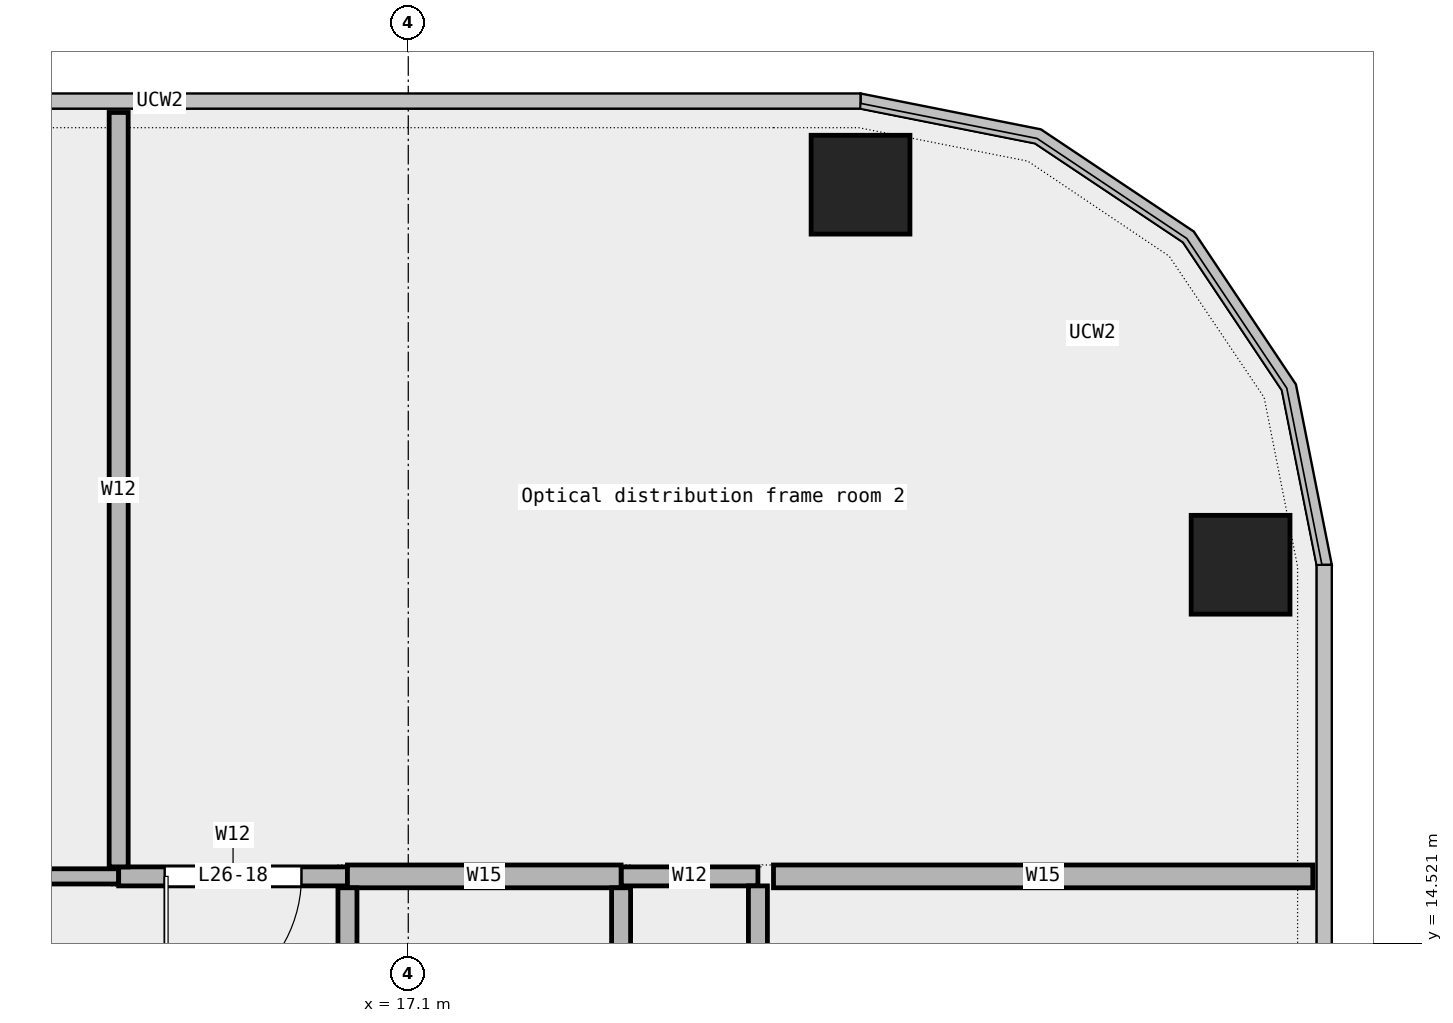
"""IFC4 building model, lengths in metres.
Left out: names, types, materials, properties, quantities, classifications, styles, units other than length and angle.
Written with IfcOpenShell. Run it as: python <this file> out.ifc"""

import sys

from ifc_helpers import new_model, si_unit, direction, frame, frame_2d, origin, origin_2d, place, context, subcontext, project, spatial, rectangle, extrude, element, fill, save


model = new_model("IFC4")
c1 = context("Model", 3, precision=1e-05, world=origin(), true_north=direction((0.0, 1.0)))
c2 = subcontext(c1, "Body", "Model", "MODEL_VIEW")
j1 = project(units=[si_unit("LENGTHUNIT", "METRE"), si_unit("PLANEANGLEUNIT", "RADIAN")], contexts=[c1])
p1 = place(None, origin())
s1 = spatial("IfcSite", under=j1, at=p1, CompositionType="ELEMENT")
p2 = place(p1, origin())
s2 = spatial("IfcBuilding", under=s1, at=p2, CompositionType="ELEMENT")
p3 = place(p2, frame((0.0, 0.0, 130.6)))
s3 = spatial("IfcBuildingStorey", under=s2, at=p3, CompositionType="ELEMENT", Elevation=130.6)
for number, where, z_axis, x_axis in (
    (1, (28.05, 19.5, 0.0), (0.0, 0.0, 1.0), (1.0, 0.0, 0.0)),
    (2, (23.05, 24.5, 0.0), (0.0, 0.0, 1.0), (1.0, 0.0, 0.0)),
):
    element("IfcColumn", number, at=place(p3, frame(where, z_axis=z_axis, x_axis=x_axis)), inside=s3, PredefinedType="COLUMN", context=c2, shape_type="SweptSolid", body=[
        extrude(rectangle(XDim=1.3, YDim=1.3, at=origin_2d()), origin(), (0.0, 0.0, 1.0), 4.05),
    ])
p4 = place(p3, frame((8.86, 15.4, 0.0), z_axis=(0.0, 0.0, 1.0), x_axis=(1.0, 0.0, 0.0)))
e3 = element("IfcWall", 3, at=p4, inside=s3, PredefinedType="PARTITIONING", context=c2, shape_type="SweptSolid", body=[
    extrude(rectangle(XDim=4.43, YDim=0.2, at=frame_2d((2.215, 0.0))), origin(), (0.0, 0.0, 1.0), 4.05),
])
p5 = place(p4, frame((1.765, 0.0, 0.0)))
e4 = element("IfcOpeningElement", 4, at=p5, cuts=e3, PredefinedType="OPENING", context=c2, shape_type="SweptSolid", body=[
    extrude(rectangle(XDim=0.9, YDim=2.1, at=frame_2d((0.45, 1.05))), frame((0.0, 0.112, 0.0), z_axis=(0.0, -1.0, 0.0), x_axis=(1.0, 0.0, 0.0)), (0.0, 0.0, 1.0), 0.224),
])
p6 = place(p3, frame((13.29, 15.4, 0.0), z_axis=(0.0, 0.0, 1.0), x_axis=(1.0, 0.0, 0.0)))
e5 = element("IfcWall", 5, at=p6, inside=s3, PredefinedType="PARTITIONING", context=c2, shape_type="SweptSolid", body=[
    extrude(rectangle(XDim=3.01, YDim=0.25, at=frame_2d((1.505, 0.0))), origin(), (0.0, 0.0, 1.0), 4.05),
])
p7 = place(p6, frame((0.605, 0.0, 0.0)))
e6 = element("IfcOpeningElement", 6, at=p7, cuts=e5, PredefinedType="OPENING", context=c2, shape_type="SweptSolid", body=[
    extrude(rectangle(XDim=1.8, YDim=2.1, at=frame_2d((0.9, 1.05))), frame((0.0, 0.137, 0.0), z_axis=(0.0, -1.0, 0.0), x_axis=(1.0, 0.0, 0.0)), (0.0, 0.0, 1.0), 0.274),
])
p8 = place(p3, frame((19.9, 15.4, 0.0), z_axis=(0.0, 0.0, 1.0), x_axis=(1.0, 0.0, 0.0)))
e7 = element("IfcWall", 7, at=p8, inside=s3, PredefinedType="PARTITIONING", context=c2, shape_type="SweptSolid", body=[
    extrude(rectangle(XDim=1.8, YDim=0.25, at=frame_2d((0.9, 0.0))), origin(), (0.0, 0.0, 1.0), 4.05),
])
p9 = place(p3, frame((16.3, 15.4, 0.0), z_axis=(0.0, 0.0, 1.0), x_axis=(1.0, 0.0, 0.0)))
e8 = element("IfcWall", 8, at=p9, inside=s3, PredefinedType="PARTITIONING", context=c2, shape_type="SweptSolid", body=[
    extrude(rectangle(XDim=3.6, YDim=0.3, at=frame_2d((1.8, 0.0))), origin(), (0.0, 0.0, 1.0), 4.05),
])
p10 = place(p3, frame((21.905, 15.4, 0.0), z_axis=(0.0, 0.0, 1.0), x_axis=(1.0, 0.0, 0.0)))
e9 = element("IfcWall", 9, at=p10, inside=s3, PredefinedType="PARTITIONING", context=c2, shape_type="SweptSolid", body=[
    extrude(rectangle(XDim=7.095, YDim=0.3, at=frame_2d((3.547, 0.0))), origin(), (0.0, 0.0, 1.0), 4.05),
])
p11 = place(p3, frame((13.29, 15.525, 0.0), z_axis=(0.0, 0.0, 1.0), x_axis=(0.0, 1.0, 0.0)))
e10 = element("IfcWall", 10, at=p11, inside=s3, PredefinedType="PARTITIONING", context=c2, shape_type="SweptSolid", body=[
    extrude(rectangle(XDim=9.925, YDim=0.25, at=frame_2d((4.962, 0.0))), origin(), (0.0, 0.0, 1.0), 4.05),
])
p12 = place(p3, frame((16.3, 11.75, 0.0), z_axis=(0.0, 0.0, 1.0), x_axis=(0.0, 1.0, 0.0)))
e11 = element("IfcWall", 11, at=p12, inside=s3, PredefinedType="PARTITIONING", context=c2, shape_type="SweptSolid", body=[
    extrude(rectangle(XDim=3.5, YDim=0.25, at=frame_2d((1.75, 0.0))), origin(), (0.0, 0.0, 1.0), 4.05),
])
p13 = place(p3, frame((19.9, 4.07, 0.0), z_axis=(0.0, 0.0, 1.0), x_axis=(0.0, 1.0, 0.0)))
e12 = element("IfcWall", 12, at=p13, inside=s3, PredefinedType="PARTITIONING", context=c2, shape_type="SweptSolid", body=[
    extrude(rectangle(XDim=11.18, YDim=0.25, at=frame_2d((5.59, 0.0))), origin(), (0.0, 0.0, 1.0), 4.05),
])
p14 = place(p13, frame((2.377, 0.0, 0.0)))
e13 = element("IfcOpeningElement", 13, at=p14, cuts=e12, PredefinedType="OPENING", context=c2, shape_type="SweptSolid", body=[
    extrude(rectangle(XDim=0.9, YDim=2.1, at=frame_2d((0.45, 1.05))), frame((0.0, 0.137, 0.0), z_axis=(0.0, -1.0, 0.0), x_axis=(1.0, 0.0, 0.0)), (0.0, 0.0, 1.0), 0.274),
])
p15 = place(p13, frame((7.968, 0.0, 0.0)))
e14 = element("IfcOpeningElement", 14, at=p15, cuts=e12, PredefinedType="OPENING", context=c2, shape_type="SweptSolid", body=[
    extrude(rectangle(XDim=0.9, YDim=2.1, at=frame_2d((0.45, 1.05))), frame((0.0, 0.137, 0.0), z_axis=(0.0, -1.0, 0.0), x_axis=(1.0, 0.0, 0.0)), (0.0, 0.0, 1.0), 0.274),
])
p16 = place(p3, frame((21.7, 5.025, 0.0), z_axis=(0.0, 0.0, 1.0), x_axis=(0.0, 1.0, 0.0)))
e15 = element("IfcWall", 15, at=p16, inside=s3, PredefinedType="PARTITIONING", context=c2, shape_type="SweptSolid", body=[
    extrude(rectangle(XDim=10.25, YDim=0.25, at=frame_2d((5.125, 0.0))), origin(), (0.0, 0.0, 1.0), 4.05),
])
p17 = place(p16, frame((4.525, 0.0, 0.0)))
e16 = element("IfcOpeningElement", 16, at=p17, cuts=e15, PredefinedType="OPENING", context=c2, shape_type="SweptSolid", body=[
    extrude(rectangle(XDim=1.2, YDim=2.1, at=frame_2d((0.6, 1.05))), frame((0.0, 0.137, 0.0), z_axis=(0.0, -1.0, 0.0), x_axis=(1.0, 0.0, 0.0)), (0.0, 0.0, 1.0), 0.274),
])
p18 = place(p7, origin())
e17 = element("IfcDoor", 17, at=p18, inside=s3, OperationType="DOUBLE_DOOR_SINGLE_SWING", PredefinedType="DOOR", context=c2, shape_type="SweptSolid", body=[
    extrude(rectangle(XDim=1.8, YDim=2.1, at=frame_2d((0.9, 1.05))), frame((0.0, 0.025, 0.0), z_axis=(0.0, -1.0, 0.0), x_axis=(1.0, 0.0, 0.0)), (0.0, 0.0, 1.0), 0.05),
])
fill(e6, e17)
save(model, sys.argv[1])
